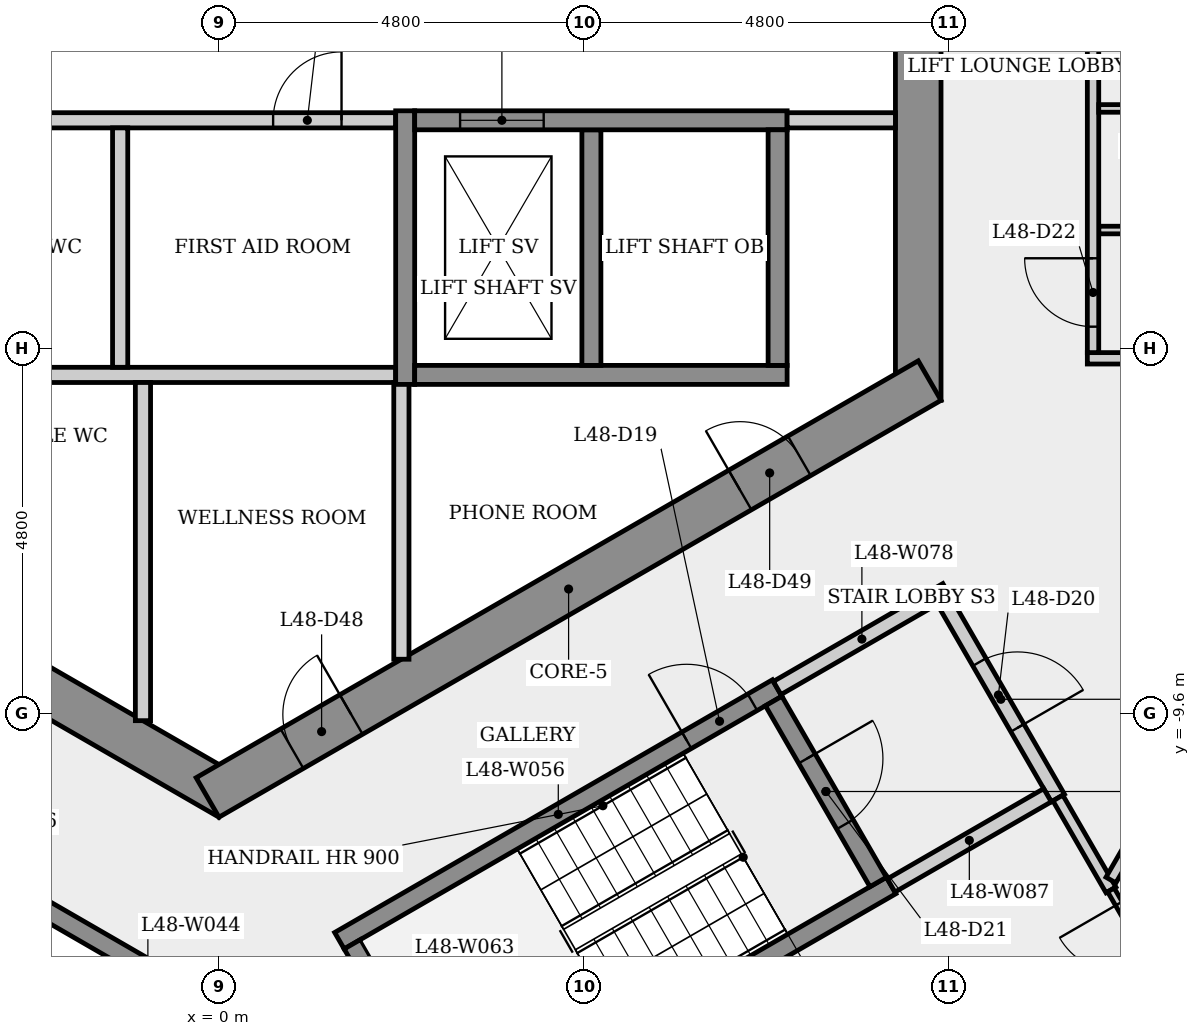
"""IFC4 building model, lengths in metres.
Left out: names, types, materials, properties, quantities, classifications, styles, units other than length and angle.
Written with IfcOpenShell. Run it as: python <this file> out.ifc"""

import sys

from ifc_helpers import new_model, si_unit, direction, frame, frame_2d, origin, place, context, subcontext, project, spatial, rectangle, extrude, element, fill, save


model = new_model("IFC4")
c1 = context("Model", 3, precision=1e-05, world=origin(), true_north=direction((0.0, 1.0)))
c2 = subcontext(c1, "Body", "Model", "MODEL_VIEW")
j1 = project(units=[si_unit("LENGTHUNIT", "METRE"), si_unit("PLANEANGLEUNIT", "RADIAN")], contexts=[c1])
p1 = place(None, origin())
s1 = spatial("IfcSite", under=j1, at=p1, CompositionType="ELEMENT")
p2 = place(p1, origin())
s2 = spatial("IfcBuilding", under=s1, at=p2, CompositionType="ELEMENT")
p3 = place(p2, frame((0.0, 0.0, 179.9)))
s3 = spatial("IfcBuildingStorey", under=s2, at=p3, CompositionType="ELEMENT", Elevation=179.9)
p4 = place(p3, frame((9.2, -5.485, 0.0), z_axis=(0.0, 0.0, 1.0), x_axis=(0.0, 1.0, 0.0)))
e1 = element("IfcWall", 1, at=p4, inside=s3, PredefinedType="SHEAR", context=c2, shape_type="SweptSolid", body=[
    extrude(rectangle(XDim=10.97, YDim=0.6, at=frame_2d((5.485, 0.0))), origin(), (0.0, 0.0, 1.0), 3.4),
])
p5 = place(p4, frame((4.685, 0.0, 0.0)))
e2 = element("IfcOpeningElement", 2, at=p5, cuts=e1, PredefinedType="OPENING", context=c2, shape_type="SweptSolid", body=[
    extrude(rectangle(XDim=1.6, YDim=2.1, at=frame_2d((0.8, 1.05))), frame((0.0, 0.31, 0.0), z_axis=(0.0, -1.0, 0.0), x_axis=(1.0, 0.0, 0.0)), (0.0, 0.0, 1.0), 0.62),
])
p6 = place(p3, frame((-9.35, -5.225, 0.0), z_axis=(0.0, 0.0, 1.0), x_axis=(0.866023993627, -0.500002442456, 0.0)))
e3 = element("IfcWall", 3, at=p6, inside=s3, PredefinedType="SHEAR", context=c2, shape_type="SweptSolid", body=[
    extrude(rectangle(XDim=10.97, YDim=0.6, at=frame_2d((5.485, 0.0))), origin(), (0.0, 0.0, 1.0), 3.4),
])
p7 = place(p6, frame((2.622, 0.0, 0.0)))
e4 = element("IfcOpeningElement", 4, at=p7, cuts=e3, PredefinedType="OPENING", context=c2, shape_type="SweptSolid", body=[
    extrude(rectangle(XDim=0.9, YDim=2.1, at=frame_2d((0.45, 1.05))), frame((0.0, 0.31, 0.0), z_axis=(0.0, -1.0, 0.0), x_axis=(1.0, 0.0, 0.0)), (0.0, 0.0, 1.0), 0.62),
])
p8 = place(p6, frame((7.172, 0.0, 0.0)))
e5 = element("IfcOpeningElement", 5, at=p8, cuts=e3, PredefinedType="OPENING", context=c2, shape_type="SweptSolid", body=[
    extrude(rectangle(XDim=0.9, YDim=2.1, at=frame_2d((0.45, 1.05))), frame((0.0, 0.31, 0.0), z_axis=(0.0, -1.0, 0.0), x_axis=(1.0, 0.0, 0.0)), (0.0, 0.0, 1.0), 0.62),
])
p9 = place(p3, frame((-0.15, -10.71, 0.0), z_axis=(0.0, 0.0, 1.0), x_axis=(0.866023993627, 0.500002442456, 0.0)))
e6 = element("IfcWall", 6, at=p9, inside=s3, PredefinedType="SHEAR", context=c2, shape_type="SweptSolid", body=[
    extrude(rectangle(XDim=10.97, YDim=0.6, at=frame_2d((5.485, 0.0))), origin(), (0.0, 0.0, 1.0), 3.4),
])
p10 = place(p9, frame((1.283, 0.0, 0.0)))
e7 = element("IfcOpeningElement", 7, at=p10, cuts=e6, PredefinedType="OPENING", context=c2, shape_type="SweptSolid", body=[
    extrude(rectangle(XDim=0.9, YDim=2.1, at=frame_2d((0.45, 1.05))), frame((0.0, 0.31, 0.0), z_axis=(0.0, -1.0, 0.0), x_axis=(1.0, 0.0, 0.0)), (0.0, 0.0, 1.0), 0.62),
])
p11 = place(p9, frame((8.09, 0.0, 0.0)))
e8 = element("IfcOpeningElement", 8, at=p11, cuts=e6, PredefinedType="OPENING", context=c2, shape_type="SweptSolid", body=[
    extrude(rectangle(XDim=0.9, YDim=2.1, at=frame_2d((0.45, 1.05))), frame((0.0, 0.31, 0.0), z_axis=(0.0, -1.0, 0.0), x_axis=(1.0, 0.0, 0.0)), (0.0, 0.0, 1.0), 0.62),
])
p12 = place(p3, frame((-8.88, -5.15, 0.0), z_axis=(0.0, 0.0, 1.0), x_axis=(1.0, 0.0, 0.0)))
e9 = element("IfcWall", 9, at=p12, inside=s3, PredefinedType="PARTITIONING", context=c2, shape_type="SweptSolid", body=[
    extrude(rectangle(XDim=11.205, YDim=0.2, at=frame_2d((5.603, 0.0))), origin(), (0.0, 0.0, 1.0), 3.05),
])
p13 = place(p3, frame((-8.9, -1.8, 0.0), z_axis=(0.0, 0.0, 1.0), x_axis=(1.0, 0.0, 0.0)))
e10 = element("IfcWall", 10, at=p13, inside=s3, PredefinedType="PARTITIONING", context=c2, shape_type="SweptSolid", body=[
    extrude(rectangle(XDim=11.225, YDim=0.2, at=frame_2d((5.613, 0.0))), origin(), (0.0, 0.0, 1.0), 3.05),
])
p14 = place(p13, frame((2.135, 0.0, 0.0)))
e11 = element("IfcOpeningElement", 11, at=p14, cuts=e10, PredefinedType="OPENING", context=c2, shape_type="SweptSolid", body=[
    extrude(rectangle(XDim=0.9, YDim=2.1, at=frame_2d((0.45, 1.05))), frame((0.0, 0.11, 0.0), z_axis=(0.0, -1.0, 0.0), x_axis=(1.0, 0.0, 0.0)), (0.0, 0.0, 1.0), 0.22),
])
p15 = place(p13, frame((5.39, 0.0, 0.0)))
e12 = element("IfcOpeningElement", 12, at=p15, cuts=e10, PredefinedType="OPENING", context=c2, shape_type="SweptSolid", body=[
    extrude(rectangle(XDim=0.9, YDim=2.1, at=frame_2d((0.45, 1.05))), frame((0.0, 0.11, 0.0), z_axis=(0.0, -1.0, 0.0), x_axis=(1.0, 0.0, 0.0)), (0.0, 0.0, 1.0), 0.22),
])
p16 = place(p13, frame((9.613, 0.0, 0.0)))
e13 = element("IfcOpeningElement", 13, at=p16, cuts=e10, PredefinedType="OPENING", context=c2, shape_type="SweptSolid", body=[
    extrude(rectangle(XDim=0.9, YDim=2.1, at=frame_2d((0.45, 1.05))), frame((0.0, 0.11, 0.0), z_axis=(0.0, -1.0, 0.0), x_axis=(1.0, 0.0, 0.0)), (0.0, 0.0, 1.0), 0.22),
])
p17 = place(p3, frame((-2.364, -12.145, 0.0), z_axis=(0.0, 0.0, 1.0), x_axis=(0.866040211805, -0.499974350878, 0.0)))
e14 = element("IfcWall", 14, at=p17, inside=s3, PredefinedType="SHEAR", context=c2, shape_type="SweptSolid", body=[
    extrude(rectangle(XDim=3.3, YDim=0.25, at=frame_2d((1.65, 0.0))), origin(), (0.0, 0.0, 1.0), 3.05),
])
p18 = place(p3, frame((-1.3, -1.9, 0.0), z_axis=(0.0, 0.0, 1.0), x_axis=(0.0, -1.0, 0.0)))
e15 = element("IfcWall", 15, at=p18, inside=s3, PredefinedType="PARTITIONING", context=c2, shape_type="SweptSolid", body=[
    extrude(rectangle(XDim=3.15, YDim=0.2, at=frame_2d((1.575, 0.0))), origin(), (0.0, 0.0, 1.0), 3.05),
])
p19 = place(p3, frame((-1.0, -5.25, 0.0), z_axis=(0.0, 0.0, 1.0), x_axis=(0.0, -1.0, 0.0)))
e16 = element("IfcWall", 16, at=p19, inside=s3, PredefinedType="PARTITIONING", context=c2, shape_type="SweptSolid", body=[
    extrude(rectangle(XDim=4.449, YDim=0.2, at=frame_2d((2.225, 0.0))), origin(), (0.0, 0.0, 1.0), 3.05),
])
p20 = place(p3, frame((1.585, -12.595, 0.0), z_axis=(0.0, 0.0, 1.0), x_axis=(0.866036417653, 0.499980922934, 0.0)))
e17 = element("IfcWall", 17, at=p20, inside=s3, PredefinedType="SHEAR", context=c2, shape_type="SweptSolid", body=[
    extrude(rectangle(XDim=6.65, YDim=0.25, at=frame_2d((3.325, 0.0))), origin(), (0.0, 0.0, 1.0), 3.05),
])
p21 = place(p20, frame((5.275, 0.0, 0.0)))
e18 = element("IfcOpeningElement", 18, at=p21, cuts=e17, PredefinedType="OPENING", context=c2, shape_type="SweptSolid", body=[
    extrude(rectangle(XDim=1.0, YDim=2.1, at=frame_2d((0.5, 1.05))), frame((0.0, 0.135, 0.0), z_axis=(0.0, -1.0, 0.0), x_axis=(1.0, 0.0, 0.0)), (0.0, 0.0, 1.0), 0.27),
])
p22 = place(p3, frame((2.4, -5.25, 0.0), z_axis=(0.0, 0.0, 1.0), x_axis=(0.0, -1.0, 0.0)))
e19 = element("IfcWall", 19, at=p22, inside=s3, PredefinedType="PARTITIONING", context=c2, shape_type="SweptSolid", body=[
    extrude(rectangle(XDim=3.641, YDim=0.2, at=frame_2d((1.821, 0.0))), origin(), (0.0, 0.0, 1.0), 3.05),
])
p23 = place(p3, frame((2.45, -5.275, 0.0), z_axis=(0.0, 0.0, 1.0), x_axis=(0.0, 1.0, 0.0)))
e20 = element("IfcWall", 20, at=p23, inside=s3, PredefinedType="SHEAR", context=c2, shape_type="SweptSolid", body=[
    extrude(rectangle(XDim=3.6, YDim=0.25, at=frame_2d((1.8, 0.0))), origin(), (0.0, 0.0, 1.0), 3.05),
])
p24 = place(p3, frame((3.256, -15.239, 0.0), z_axis=(0.0, 0.0, 1.0), x_axis=(-0.50002537861, 0.866010750942, 0.0)))
e21 = element("IfcWall", 21, at=p24, inside=s3, PredefinedType="SHEAR", context=c2, shape_type="SweptSolid", body=[
    extrude(rectangle(XDim=3.0, YDim=0.25, at=frame_2d((1.5, 0.0))), origin(), (0.0, 0.0, 1.0), 3.05),
])
p25 = place(p3, frame((2.575, -5.15, 0.0), z_axis=(0.0, 0.0, 1.0), x_axis=(1.0, 0.0, 0.0)))
e22 = element("IfcWall", 22, at=p25, inside=s3, PredefinedType="SHEAR", context=c2, shape_type="SweptSolid", body=[
    extrude(rectangle(XDim=4.9, YDim=0.25, at=frame_2d((2.45, 0.0))), origin(), (0.0, 0.0, 1.0), 3.05),
])
p26 = place(p3, frame((4.9, -1.925, 0.0), z_axis=(0.0, 0.0, 1.0), x_axis=(0.0, -1.0, 0.0)))
e23 = element("IfcWall", 23, at=p26, inside=s3, PredefinedType="SHEAR", context=c2, shape_type="SweptSolid", body=[
    extrude(rectangle(XDim=3.1, YDim=0.25, at=frame_2d((1.55, 0.0))), origin(), (0.0, 0.0, 1.0), 3.4),
])
p27 = place(p3, frame((2.575, -1.8, 0.0), z_axis=(0.0, 0.0, 1.0), x_axis=(1.0, 0.0, 0.0)))
e24 = element("IfcWall", 24, at=p27, inside=s3, PredefinedType="SHEAR", context=c2, shape_type="SweptSolid", body=[
    extrude(rectangle(XDim=4.9, YDim=0.25, at=frame_2d((2.45, 0.0))), origin(), (0.0, 0.0, 1.0), 3.05),
])
p28 = place(p27, frame((0.597, 0.0, 0.0)))
e25 = element("IfcOpeningElement", 25, at=p28, cuts=e24, PredefinedType="OPENING", context=c2, shape_type="SweptSolid", body=[
    extrude(rectangle(XDim=1.1, YDim=2.1, at=frame_2d((0.55, 1.05))), frame((0.0, 0.135, 0.0), z_axis=(0.0, -1.0, 0.0), x_axis=(1.0, 0.0, 0.0)), (0.0, 0.0, 1.0), 0.27),
])
p29 = place(p3, frame((3.301, -15.068, 0.0), z_axis=(0.0, 0.0, 1.0), x_axis=(0.866035036182, 0.499983315828, 0.0)))
e26 = element("IfcWall", 26, at=p29, inside=s3, PredefinedType="SHEAR", context=c2, shape_type="SweptSolid", body=[
    extrude(rectangle(XDim=6.4, YDim=0.25, at=frame_2d((3.2, 0.0))), origin(), (0.0, 0.0, 1.0), 3.05),
])
p30 = place(p3, frame((7.298, -9.441, 0.0), z_axis=(0.0, 0.0, 1.0), x_axis=(0.500034990121, -0.866005201286, 0.0)))
e27 = element("IfcWall", 27, at=p30, inside=s3, PredefinedType="SHEAR", context=c2, shape_type="SweptSolid", body=[
    extrude(rectangle(XDim=2.75, YDim=0.25, at=frame_2d((1.375, 0.0))), origin(), (0.0, 0.0, 1.0), 3.05),
])
p31 = place(p30, frame((0.875, 0.0, 0.0)))
e28 = element("IfcOpeningElement", 28, at=p31, cuts=e27, PredefinedType="OPENING", context=c2, shape_type="SweptSolid", body=[
    extrude(rectangle(XDim=1.0, YDim=2.1, at=frame_2d((0.5, 1.05))), frame((0.0, 0.135, 0.0), z_axis=(0.0, -1.0, 0.0), x_axis=(1.0, 0.0, 0.0)), (0.0, 0.0, 1.0), 0.27),
])
p32 = place(p3, frame((7.344, -9.27, 0.0), z_axis=(0.0, 0.0, 1.0), x_axis=(0.866005588531, 0.500034319456, 0.0)))
e29 = element("IfcWall", 29, at=p32, inside=s3, PredefinedType="PARTITIONING", context=c2, shape_type="SweptSolid", body=[
    extrude(rectangle(XDim=2.575, YDim=0.2, at=frame_2d((1.288, 0.0))), origin(), (0.0, 0.0, 1.0), 3.05),
])
p33 = place(p3, frame((7.35, -1.925, 0.0), z_axis=(0.0, 0.0, 1.0), x_axis=(0.0, -1.0, 0.0)))
e30 = element("IfcWall", 30, at=p33, inside=s3, PredefinedType="SHEAR", context=c2, shape_type="SweptSolid", body=[
    extrude(rectangle(XDim=3.1, YDim=0.25, at=frame_2d((1.55, 0.0))), origin(), (0.0, 0.0, 1.0), 3.4),
])
p34 = place(p3, frame((8.9, -1.8, 0.0), z_axis=(0.0, 0.0, 1.0), x_axis=(-1.0, 0.0, 0.0)))
e31 = element("IfcWall", 31, at=p34, inside=s3, PredefinedType="PARTITIONING", context=c2, shape_type="SweptSolid", body=[
    extrude(rectangle(XDim=1.425, YDim=0.2, at=frame_2d((0.712, 0.0))), origin(), (0.0, 0.0, 1.0), 3.05),
])
p35 = place(p3, frame((9.537, -8.119, 0.0), z_axis=(0.0, 0.0, 1.0), x_axis=(0.499990139034, -0.866031096941, 0.0)))
e32 = element("IfcWall", 32, at=p35, inside=s3, PredefinedType="PARTITIONING", context=c2, shape_type="SweptSolid", body=[
    extrude(rectangle(XDim=3.0, YDim=0.2, at=frame_2d((1.5, 0.0))), origin(), (0.0, 0.0, 1.0), 3.05),
])
p36 = place(p35, frame((0.935, 0.0, 0.0)))
e33 = element("IfcOpeningElement", 33, at=p36, cuts=e32, PredefinedType="OPENING", context=c2, shape_type="SweptSolid", body=[
    extrude(rectangle(XDim=1.0, YDim=2.1, at=frame_2d((0.5, 1.05))), frame((0.0, 0.11, 0.0), z_axis=(0.0, -1.0, 0.0), x_axis=(1.0, 0.0, 0.0)), (0.0, 0.0, 1.0), 0.22),
])
p37 = place(p3, frame((10.901, -10.681, 0.0), z_axis=(0.0, 0.0, 1.0), x_axis=(-0.866007538022, -0.500030943131, 0.0)))
e34 = element("IfcWall", 34, at=p37, inside=s3, PredefinedType="PARTITIONING", context=c2, shape_type="SweptSolid", body=[
    extrude(rectangle(XDim=2.375, YDim=0.2, at=frame_2d((1.188, 0.0))), origin(), (0.0, 0.0, 1.0), 3.05),
])
p38 = place(p3, frame((11.425, -4.932, 0.0), z_axis=(0.0, 0.0, 1.0), x_axis=(1.0, 0.0, 0.0)))
e35 = element("IfcWall", 35, at=p38, inside=s3, PredefinedType="PARTITIONING", context=c2, shape_type="SweptSolid", body=[
    extrude(rectangle(XDim=4.349, YDim=0.15, at=frame_2d((2.175, 0.0))), origin(), (0.0, 0.0, 1.0), 3.05),
])
p39 = place(p3, frame((11.575, -3.244, 0.0), z_axis=(0.0, 0.0, 1.0), x_axis=(1.0, 0.0, 0.0)))
e36 = element("IfcWall", 36, at=p39, inside=s3, PredefinedType="PARTITIONING", context=c2, shape_type="SweptSolid", body=[
    extrude(rectangle(XDim=2.775, YDim=0.1, at=frame_2d((1.388, 0.0))), origin(), (0.0, 0.0, 1.0), 3.05),
])
p40 = place(p39, frame((0.962, 0.0, 0.0)))
e37 = element("IfcOpeningElement", 37, at=p40, cuts=e36, PredefinedType="OPENING", context=c2, shape_type="SweptSolid", body=[
    extrude(rectangle(XDim=0.8, YDim=2.1, at=frame_2d((0.4, 1.05))), frame((0.0, 0.06, 0.0), z_axis=(0.0, -1.0, 0.0), x_axis=(1.0, 0.0, 0.0)), (0.0, 0.0, 1.0), 0.12),
])
p41 = place(p3, frame((11.5, -4.857, 0.0), z_axis=(0.0, 0.0, 1.0), x_axis=(0.0, 1.0, 0.0)))
e38 = element("IfcWall", 38, at=p41, inside=s3, PredefinedType="PARTITIONING", context=c2, shape_type="SweptSolid", body=[
    extrude(rectangle(XDim=9.864, YDim=0.15, at=frame_2d((4.932, 0.0))), origin(), (0.0, 0.0, 1.0), 3.05),
])
p42 = place(p41, frame((0.341, 0.0, 0.0)))
e39 = element("IfcOpeningElement", 39, at=p42, cuts=e38, PredefinedType="OPENING", context=c2, shape_type="SweptSolid", body=[
    extrude(rectangle(XDim=0.9, YDim=2.1, at=frame_2d((0.45, 1.05))), frame((0.0, 0.085, 0.0), z_axis=(0.0, -1.0, 0.0), x_axis=(1.0, 0.0, 0.0)), (0.0, 0.0, 1.0), 0.17),
])
p43 = place(p41, frame((6.001, 0.0, 0.0)))
e40 = element("IfcOpeningElement", 40, at=p43, cuts=e38, PredefinedType="OPENING", context=c2, shape_type="SweptSolid", body=[
    extrude(rectangle(XDim=1.0, YDim=2.1, at=frame_2d((0.5, 1.05))), frame((0.0, 0.085, 0.0), z_axis=(0.0, -1.0, 0.0), x_axis=(1.0, 0.0, 0.0)), (0.0, 0.0, 1.0), 0.17),
])
p44 = place(p3, frame((11.575, -1.644, 0.0), z_axis=(0.0, 0.0, 1.0), x_axis=(1.0, 0.0, 0.0)))
e41 = element("IfcWall", 41, at=p44, inside=s3, PredefinedType="PARTITIONING", context=c2, shape_type="SweptSolid", body=[
    extrude(rectangle(XDim=6.612, YDim=0.1, at=frame_2d((3.306, 0.0))), origin(), (0.0, 0.0, 1.0), 3.05),
])
p45 = place(p3, frame((11.736, -11.927, 0.0), z_axis=(0.0, 0.0, 1.0), x_axis=(-0.499898978922, 0.866083720475, 0.0)))
e42 = element("IfcWall", 42, at=p45, inside=s3, PredefinedType="PARTITIONING", context=c2, shape_type="SweptSolid", body=[
    extrude(rectangle(XDim=1.397, YDim=0.15, at=frame_2d((0.698, 0.0))), origin(), (0.0, 0.0, 1.0), 3.05),
])
p46 = place(p3, frame((12.729, -13.647, 0.0), z_axis=(0.0, 0.0, 1.0), x_axis=(-0.50005230485, 0.865995203459, 0.0)))
e43 = element("IfcWall", 43, at=p46, inside=s3, PredefinedType="PARTITIONING", context=c2, shape_type="SweptSolid", body=[
    extrude(rectangle(XDim=1.986, YDim=0.1, at=frame_2d((0.993, 0.0))), origin(), (0.0, 0.0, 1.0), 3.05),
])
p47 = place(p46, frame((0.878, 0.0, 0.0)))
e44 = element("IfcOpeningElement", 44, at=p47, cuts=e43, PredefinedType="OPENING", context=c2, shape_type="SweptSolid", body=[
    extrude(rectangle(XDim=0.9, YDim=2.1, at=frame_2d((0.45, 1.05))), frame((0.0, 0.06, 0.0), z_axis=(0.0, -1.0, 0.0), x_axis=(1.0, 0.0, 0.0)), (0.0, 0.0, 1.0), 0.12),
])
p48 = place(p3, frame((15.662, -4.997, 0.0), z_axis=(0.0, 0.0, 1.0), x_axis=(-0.500001468015, -0.866024556224, 0.0)))
e45 = element("IfcWall", 45, at=p48, inside=s3, PredefinedType="PARTITIONING", context=c2, shape_type="SweptSolid", body=[
    extrude(rectangle(XDim=7.852, YDim=0.15, at=frame_2d((3.926, 0.0))), origin(), (0.0, 0.0, 1.0), 3.05),
])
p49 = place(p48, frame((3.426, 0.0, 0.0)))
e46 = element("IfcOpeningElement", 46, at=p49, cuts=e45, PredefinedType="OPENING", context=c2, shape_type="SweptSolid", body=[
    extrude(rectangle(XDim=1.0, YDim=2.1, at=frame_2d((0.5, 1.05))), frame((0.0, 0.085, 0.0), z_axis=(0.0, -1.0, 0.0), x_axis=(1.0, 0.0, 0.0)), (0.0, 0.0, 1.0), 0.17),
])
p50 = place(p28, origin())
e47 = element("IfcDoor", 47, at=p50, inside=s3, OperationType="SLIDING_TO_LEFT", PredefinedType="DOOR", context=c2, shape_type="SweptSolid", body=[
    extrude(rectangle(XDim=1.1, YDim=2.1, at=frame_2d((0.55, 1.05))), frame((0.0, 0.025, 0.0), z_axis=(0.0, -1.0, 0.0), x_axis=(1.0, 0.0, 0.0)), (0.0, 0.0, 1.0), 0.05),
])
fill(e25, e47)
p51 = place(p16, origin())
e48 = element("IfcDoor", 48, at=p51, inside=s3, OperationType="SINGLE_SWING_RIGHT", PredefinedType="DOOR", context=c2, shape_type="SweptSolid", body=[
    extrude(rectangle(XDim=0.9, YDim=2.1, at=frame_2d((0.45, 1.05))), frame((0.0, 0.025, 0.0), z_axis=(0.0, -1.0, 0.0), x_axis=(1.0, 0.0, 0.0)), (0.0, 0.0, 1.0), 0.05),
])
fill(e13, e48)
p52 = place(p21, origin())
e49 = element("IfcDoor", 49, at=p52, inside=s3, OperationType="SINGLE_SWING_LEFT", PredefinedType="DOOR", context=c2, shape_type="SweptSolid", body=[
    extrude(rectangle(XDim=1.0, YDim=2.1, at=frame_2d((0.5, 1.05))), frame((0.0, 0.025, 0.0), z_axis=(0.0, -1.0, 0.0), x_axis=(1.0, 0.0, 0.0)), (0.0, 0.0, 1.0), 0.05),
])
fill(e18, e49)
p53 = place(p36, origin())
e50 = element("IfcDoor", 50, at=p53, inside=s3, OperationType="SINGLE_SWING_RIGHT", PredefinedType="DOOR", context=c2, shape_type="SweptSolid", body=[
    extrude(rectangle(XDim=1.0, YDim=2.1, at=frame_2d((0.5, 1.05))), frame((0.0, 0.025, 0.0), z_axis=(0.0, -1.0, 0.0), x_axis=(1.0, 0.0, 0.0)), (0.0, 0.0, 1.0), 0.05),
])
fill(e33, e50)
p54 = place(p31, origin())
e51 = element("IfcDoor", 51, at=p54, inside=s3, OperationType="SINGLE_SWING_LEFT", PredefinedType="DOOR", context=c2, shape_type="SweptSolid", body=[
    extrude(rectangle(XDim=1.0, YDim=2.1, at=frame_2d((0.5, 1.05))), frame((0.0, 0.025, 0.0), z_axis=(0.0, -1.0, 0.0), x_axis=(1.0, 0.0, 0.0)), (0.0, 0.0, 1.0), 0.05),
])
fill(e28, e51)
p55 = place(p42, origin())
e52 = element("IfcDoor", 52, at=p55, inside=s3, OperationType="SINGLE_SWING_RIGHT", PredefinedType="DOOR", context=c2, shape_type="SweptSolid", body=[
    extrude(rectangle(XDim=0.9, YDim=2.1, at=frame_2d((0.45, 1.05))), frame((0.0, 0.025, 0.0), z_axis=(0.0, -1.0, 0.0), x_axis=(1.0, 0.0, 0.0)), (0.0, 0.0, 1.0), 0.05),
])
fill(e39, e52)
p56 = place(p47, origin())
e53 = element("IfcDoor", 53, at=p56, inside=s3, OperationType="SINGLE_SWING_RIGHT", PredefinedType="DOOR", context=c2, shape_type="SweptSolid", body=[
    extrude(rectangle(XDim=0.9, YDim=2.1, at=frame_2d((0.45, 1.05))), frame((0.0, 0.025, 0.0), z_axis=(0.0, -1.0, 0.0), x_axis=(1.0, 0.0, 0.0)), (0.0, 0.0, 1.0), 0.05),
])
fill(e44, e53)
p57 = place(p10, origin())
e54 = element("IfcDoor", 54, at=p57, inside=s3, OperationType="SINGLE_SWING_RIGHT", PredefinedType="DOOR", context=c2, shape_type="SweptSolid", body=[
    extrude(rectangle(XDim=0.9, YDim=2.1, at=frame_2d((0.45, 1.05))), frame((0.0, 0.025, 0.0), z_axis=(0.0, -1.0, 0.0), x_axis=(1.0, 0.0, 0.0)), (0.0, 0.0, 1.0), 0.05),
])
fill(e7, e54)
p58 = place(p11, origin())
e55 = element("IfcDoor", 55, at=p58, inside=s3, OperationType="SINGLE_SWING_LEFT", PredefinedType="DOOR", context=c2, shape_type="SweptSolid", body=[
    extrude(rectangle(XDim=0.9, YDim=2.1, at=frame_2d((0.45, 1.05))), frame((0.0, 0.025, 0.0), z_axis=(0.0, -1.0, 0.0), x_axis=(1.0, 0.0, 0.0)), (0.0, 0.0, 1.0), 0.05),
])
fill(e8, e55)
save(model, sys.argv[1])
